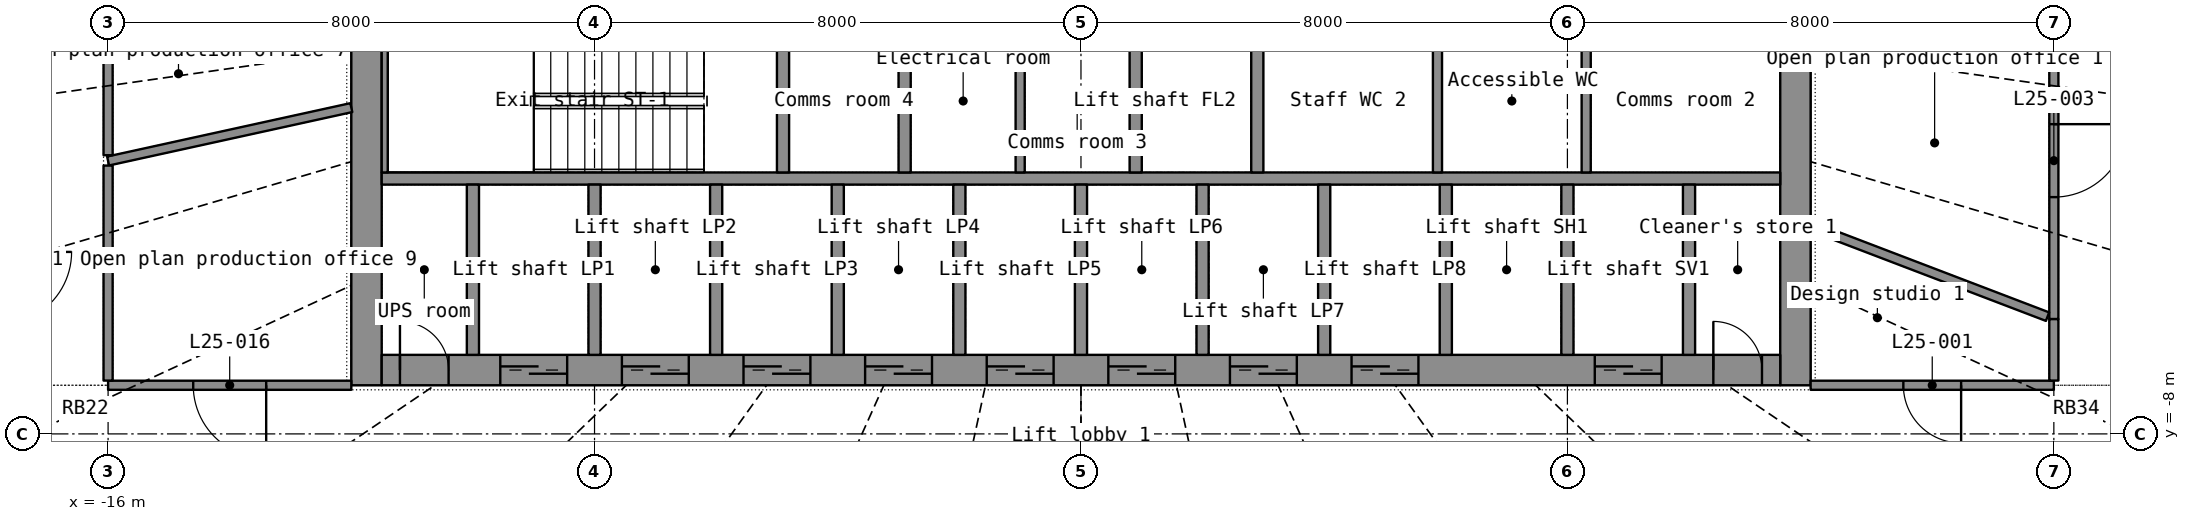
"""IFC4 building model, lengths in metres.
Left out: names, types, materials, properties, quantities, classifications, styles, units other than length and angle.
Written with IfcOpenShell. Run it as: python <this file> out.ifc"""

import sys

from ifc_helpers import new_model, si_unit, direction, frame, frame_2d, origin, place, context, subcontext, project, spatial, rectangle, extrude, element, fill, save


model = new_model("IFC4")
c1 = context("Model", 3, precision=1e-05, world=origin(), true_north=direction((0.0, 1.0)))
c2 = subcontext(c1, "Body", "Model", "MODEL_VIEW")
j1 = project(units=[si_unit("LENGTHUNIT", "METRE"), si_unit("PLANEANGLEUNIT", "RADIAN")], contexts=[c1])
p1 = place(None, origin())
s1 = spatial("IfcSite", under=j1, at=p1, CompositionType="ELEMENT")
p2 = place(p1, origin())
s2 = spatial("IfcBuilding", under=s1, at=p2, CompositionType="ELEMENT")
p3 = place(p2, frame((0.0, 0.0, 108.2)))
s3 = spatial("IfcBuildingStorey", under=s2, at=p3, CompositionType="ELEMENT", Elevation=108.2)
p4 = place(p3, frame((-11.75, -7.2, 0.0), z_axis=(0.0, 0.0, 1.0), x_axis=(0.0, 1.0, 0.0)))
e1 = element("IfcWall", 1, at=p4, inside=s3, PredefinedType="SHEAR", context=c2, shape_type="SweptSolid", body=[
    extrude(rectangle(XDim=14.4, YDim=0.5, at=frame_2d((7.2, 0.0))), origin(), (0.0, 0.0, 1.0), 3.3),
])
p5 = place(p4, frame((6.5, 0.0, 0.0)))
e2 = element("IfcOpeningElement", 2, at=p5, cuts=e1, PredefinedType="OPENING", context=c2, shape_type="SweptSolid", body=[
    extrude(rectangle(XDim=1.4, YDim=2.2, at=frame_2d((0.7, 1.1))), frame((0.0, 0.26, 0.0), z_axis=(0.0, -1.0, 0.0), x_axis=(1.0, 0.0, 0.0)), (0.0, 0.0, 1.0), 0.52),
])
p6 = place(p3, frame((11.75, -7.2, 0.0), z_axis=(0.0, 0.0, 1.0), x_axis=(0.0, 1.0, 0.0)))
e3 = element("IfcWall", 3, at=p6, inside=s3, PredefinedType="SHEAR", context=c2, shape_type="SweptSolid", body=[
    extrude(rectangle(XDim=14.4, YDim=0.5, at=frame_2d((7.2, 0.0))), origin(), (0.0, 0.0, 1.0), 3.3),
])
p7 = place(p6, frame((6.5, 0.0, 0.0)))
e4 = element("IfcOpeningElement", 4, at=p7, cuts=e3, PredefinedType="OPENING", context=c2, shape_type="SweptSolid", body=[
    extrude(rectangle(XDim=1.4, YDim=2.2, at=frame_2d((0.7, 1.1))), frame((0.0, 0.26, 0.0), z_axis=(0.0, -1.0, 0.0), x_axis=(1.0, 0.0, 0.0)), (0.0, 0.0, 1.0), 0.52),
])
p8 = place(p3, frame((-11.5, -6.95, 0.0), z_axis=(0.0, 0.0, 1.0), x_axis=(1.0, 0.0, 0.0)))
e5 = element("IfcWall", 5, at=p8, inside=s3, PredefinedType="SHEAR", context=c2, shape_type="SweptSolid", body=[
    extrude(rectangle(XDim=23.0, YDim=0.5, at=frame_2d((11.5, 0.0))), origin(), (0.0, 0.0, 1.0), 3.3),
])
p9 = place(p8, frame((1.95, 0.0, 0.0)))
e6 = element("IfcOpeningElement", 6, at=p9, cuts=e5, PredefinedType="OPENING", context=c2, shape_type="SweptSolid", body=[
    extrude(rectangle(XDim=1.1, YDim=2.2, at=frame_2d((0.55, 1.1))), frame((0.0, 0.26, 0.0), z_axis=(0.0, -1.0, 0.0), x_axis=(1.0, 0.0, 0.0)), (0.0, 0.0, 1.0), 0.52),
])
p10 = place(p8, frame((3.95, 0.0, 0.0)))
e7 = element("IfcOpeningElement", 7, at=p10, cuts=e5, PredefinedType="OPENING", context=c2, shape_type="SweptSolid", body=[
    extrude(rectangle(XDim=1.1, YDim=2.2, at=frame_2d((0.55, 1.1))), frame((0.0, 0.26, 0.0), z_axis=(0.0, -1.0, 0.0), x_axis=(1.0, 0.0, 0.0)), (0.0, 0.0, 1.0), 0.52),
])
p11 = place(p8, frame((5.95, 0.0, 0.0)))
e8 = element("IfcOpeningElement", 8, at=p11, cuts=e5, PredefinedType="OPENING", context=c2, shape_type="SweptSolid", body=[
    extrude(rectangle(XDim=1.1, YDim=2.2, at=frame_2d((0.55, 1.1))), frame((0.0, 0.26, 0.0), z_axis=(0.0, -1.0, 0.0), x_axis=(1.0, 0.0, 0.0)), (0.0, 0.0, 1.0), 0.52),
])
p12 = place(p8, frame((7.95, 0.0, 0.0)))
e9 = element("IfcOpeningElement", 9, at=p12, cuts=e5, PredefinedType="OPENING", context=c2, shape_type="SweptSolid", body=[
    extrude(rectangle(XDim=1.1, YDim=2.2, at=frame_2d((0.55, 1.1))), frame((0.0, 0.26, 0.0), z_axis=(0.0, -1.0, 0.0), x_axis=(1.0, 0.0, 0.0)), (0.0, 0.0, 1.0), 0.52),
])
p13 = place(p8, frame((9.95, 0.0, 0.0)))
e10 = element("IfcOpeningElement", 10, at=p13, cuts=e5, PredefinedType="OPENING", context=c2, shape_type="SweptSolid", body=[
    extrude(rectangle(XDim=1.1, YDim=2.2, at=frame_2d((0.55, 1.1))), frame((0.0, 0.26, 0.0), z_axis=(0.0, -1.0, 0.0), x_axis=(1.0, 0.0, 0.0)), (0.0, 0.0, 1.0), 0.52),
])
p14 = place(p8, frame((11.95, 0.0, 0.0)))
e11 = element("IfcOpeningElement", 11, at=p14, cuts=e5, PredefinedType="OPENING", context=c2, shape_type="SweptSolid", body=[
    extrude(rectangle(XDim=1.1, YDim=2.2, at=frame_2d((0.55, 1.1))), frame((0.0, 0.26, 0.0), z_axis=(0.0, -1.0, 0.0), x_axis=(1.0, 0.0, 0.0)), (0.0, 0.0, 1.0), 0.52),
])
p15 = place(p8, frame((13.95, 0.0, 0.0)))
e12 = element("IfcOpeningElement", 12, at=p15, cuts=e5, PredefinedType="OPENING", context=c2, shape_type="SweptSolid", body=[
    extrude(rectangle(XDim=1.1, YDim=2.2, at=frame_2d((0.55, 1.1))), frame((0.0, 0.26, 0.0), z_axis=(0.0, -1.0, 0.0), x_axis=(1.0, 0.0, 0.0)), (0.0, 0.0, 1.0), 0.52),
])
p16 = place(p8, frame((15.95, 0.0, 0.0)))
e13 = element("IfcOpeningElement", 13, at=p16, cuts=e5, PredefinedType="OPENING", context=c2, shape_type="SweptSolid", body=[
    extrude(rectangle(XDim=1.1, YDim=2.2, at=frame_2d((0.55, 1.1))), frame((0.0, 0.26, 0.0), z_axis=(0.0, -1.0, 0.0), x_axis=(1.0, 0.0, 0.0)), (0.0, 0.0, 1.0), 0.52),
])
p17 = place(p8, frame((19.95, 0.0, 0.0)))
e14 = element("IfcOpeningElement", 14, at=p17, cuts=e5, PredefinedType="OPENING", context=c2, shape_type="SweptSolid", body=[
    extrude(rectangle(XDim=1.1, YDim=2.2, at=frame_2d((0.55, 1.1))), frame((0.0, 0.26, 0.0), z_axis=(0.0, -1.0, 0.0), x_axis=(1.0, 0.0, 0.0)), (0.0, 0.0, 1.0), 0.52),
])
p18 = place(p8, frame((0.3, 0.0, 0.0)))
e15 = element("IfcOpeningElement", 15, at=p18, cuts=e5, PredefinedType="OPENING", context=c2, shape_type="SweptSolid", body=[
    extrude(rectangle(XDim=0.8, YDim=2.05, at=frame_2d((0.4, 1.025))), frame((0.0, 0.26, 0.0), z_axis=(0.0, -1.0, 0.0), x_axis=(1.0, 0.0, 0.0)), (0.0, 0.0, 1.0), 0.52),
])
p19 = place(p8, frame((21.9, 0.0, 0.0)))
e16 = element("IfcOpeningElement", 16, at=p19, cuts=e5, PredefinedType="OPENING", context=c2, shape_type="SweptSolid", body=[
    extrude(rectangle(XDim=0.8, YDim=2.05, at=frame_2d((0.4, 1.025))), frame((0.0, 0.26, 0.0), z_axis=(0.0, -1.0, 0.0), x_axis=(1.0, 0.0, 0.0)), (0.0, 0.0, 1.0), 0.52),
])
p20 = place(p3, frame((-11.5, -3.8, 0.0), z_axis=(0.0, 0.0, 1.0), x_axis=(1.0, 0.0, 0.0)))
e17 = element("IfcWall", 17, at=p20, inside=s3, PredefinedType="SHEAR", context=c2, shape_type="SweptSolid", body=[
    extrude(rectangle(XDim=23.0, YDim=0.2, at=frame_2d((11.5, 0.0))), origin(), (0.0, 0.0, 1.0), 3.3),
])
for number, where, z_axis, x_axis in (
    (18, (-10.0, -6.7, 0.0), (0.0, 0.0, 1.0), (0.0, 1.0, 0.0)),
    (19, (-8.0, -6.7, 0.0), (0.0, 0.0, 1.0), (0.0, 1.0, 0.0)),
    (20, (-6.0, -6.7, 0.0), (0.0, 0.0, 1.0), (0.0, 1.0, 0.0)),
    (21, (-4.0, -6.7, 0.0), (0.0, 0.0, 1.0), (0.0, 1.0, 0.0)),
    (22, (-2.0, -6.7, 0.0), (0.0, 0.0, 1.0), (0.0, 1.0, 0.0)),
    (23, (0.0, -6.7, 0.0), (0.0, 0.0, 1.0), (0.0, 1.0, 0.0)),
    (24, (2.0, -6.7, 0.0), (0.0, 0.0, 1.0), (0.0, 1.0, 0.0)),
    (25, (4.0, -6.7, 0.0), (0.0, 0.0, 1.0), (0.0, 1.0, 0.0)),
    (26, (6.0, -6.7, 0.0), (0.0, 0.0, 1.0), (0.0, 1.0, 0.0)),
    (27, (8.0, -6.7, 0.0), (0.0, 0.0, 1.0), (0.0, 1.0, 0.0)),
    (28, (10.0, -6.7, 0.0), (0.0, 0.0, 1.0), (0.0, 1.0, 0.0)),
):
    element("IfcWall", number, at=place(p3, frame(where, z_axis=z_axis, x_axis=x_axis)), inside=s3, PredefinedType="SHEAR", context=c2, shape_type="SweptSolid", body=[
        extrude(rectangle(XDim=2.8, YDim=0.2, at=frame_2d((1.4, 0.0))), origin(), (0.0, 0.0, 1.0), 3.3),
    ])
p21 = place(p3, frame((-2.9, -3.7, 0.0), z_axis=(0.0, 0.0, 1.0), x_axis=(0.0, 1.0, 0.0)))
e29 = element("IfcWall", 29, at=p21, inside=s3, PredefinedType="SHEAR", context=c2, shape_type="SweptSolid", body=[
    extrude(rectangle(XDim=7.4, YDim=0.2, at=frame_2d((3.7, 0.0))), origin(), (0.0, 0.0, 1.0), 3.3),
])
p22 = place(p21, frame((3.1, 0.0, 0.0)))
e30 = element("IfcOpeningElement", 30, at=p22, cuts=e29, PredefinedType="OPENING", context=c2, shape_type="SweptSolid", body=[
    extrude(rectangle(XDim=1.2, YDim=2.2, at=frame_2d((0.6, 1.1))), frame((0.0, 0.11, 0.0), z_axis=(0.0, -1.0, 0.0), x_axis=(1.0, 0.0, 0.0)), (0.0, 0.0, 1.0), 0.22),
])
p23 = place(p3, frame((2.9, -3.7, 0.0), z_axis=(0.0, 0.0, 1.0), x_axis=(0.0, 1.0, 0.0)))
e31 = element("IfcWall", 31, at=p23, inside=s3, PredefinedType="SHEAR", context=c2, shape_type="SweptSolid", body=[
    extrude(rectangle(XDim=7.4, YDim=0.2, at=frame_2d((3.7, 0.0))), origin(), (0.0, 0.0, 1.0), 3.3),
])
p24 = place(p23, frame((3.1, 0.0, 0.0)))
e32 = element("IfcOpeningElement", 32, at=p24, cuts=e31, PredefinedType="OPENING", context=c2, shape_type="SweptSolid", body=[
    extrude(rectangle(XDim=1.2, YDim=2.2, at=frame_2d((0.6, 1.1))), frame((0.0, 0.11, 0.0), z_axis=(0.0, -1.0, 0.0), x_axis=(1.0, 0.0, 0.0)), (0.0, 0.0, 1.0), 0.22),
])
p25 = place(p3, frame((0.9, -3.7, 0.0), z_axis=(0.0, 0.0, 1.0), x_axis=(0.0, 1.0, 0.0)))
e33 = element("IfcWall", 33, at=p25, inside=s3, PredefinedType="SHEAR", context=c2, shape_type="SweptSolid", body=[
    extrude(rectangle(XDim=2.35, YDim=0.2, at=frame_2d((1.175, 0.0))), origin(), (0.0, 0.0, 1.0), 3.3),
])
p26 = place(p3, frame((-11.45, -3.7, 0.0), z_axis=(0.0, 0.0, 1.0), x_axis=(0.0, 1.0, 0.0)))
e34 = element("IfcWall", 34, at=p26, inside=s3, PredefinedType="SHEAR", context=c2, shape_type="SweptSolid", body=[
    extrude(rectangle(XDim=2.35, YDim=0.1, at=frame_2d((1.175, 0.0))), origin(), (0.0, 0.0, 1.0), 3.3),
])
p27 = place(p3, frame((-4.9, -3.7, 0.0), z_axis=(0.0, 0.0, 1.0), x_axis=(0.0, 1.0, 0.0)))
e35 = element("IfcWall", 35, at=p27, inside=s3, PredefinedType="SHEAR", context=c2, shape_type="SweptSolid", body=[
    extrude(rectangle(XDim=2.35, YDim=0.2, at=frame_2d((1.175, 0.0))), origin(), (0.0, 0.0, 1.0), 3.3),
])
for number, where, z_axis, x_axis in (
    (36, (5.863, -3.7, 0.0), (0.0, 0.0, 1.0), (0.0, 1.0, 0.0)),
    (37, (8.309, -3.7, 0.0), (0.0, 0.0, 1.0), (0.0, 1.0, 0.0)),
    (38, (-1.0, -3.7, 0.0), (0.0, 0.0, 1.0), (0.0, 1.0, 0.0)),
):
    element("IfcWall", number, at=place(p3, frame(where, z_axis=z_axis, x_axis=x_axis)), inside=s3, PredefinedType="PARTITIONING", context=c2, shape_type="SweptSolid", body=[
        extrude(rectangle(XDim=2.35, YDim=0.15, at=frame_2d((1.175, 0.0))), origin(), (0.0, 0.0, 1.0), 3.3),
    ])
p28 = place(p3, frame((16.0, -0.9, 0.0), z_axis=(0.0, 0.0, 1.0), x_axis=(0.0, -1.0, 0.0)))
e39 = element("IfcWall", 39, at=p28, inside=s3, PredefinedType="PARTITIONING", context=c2, shape_type="SweptSolid", body=[
    extrude(rectangle(XDim=5.211, YDim=0.15, at=frame_2d((2.606, 0.0))), origin(), (0.0, 0.0, 1.0), 2.4),
])
p29 = place(p28, frame((2.006, 0.0, 0.0)))
e40 = element("IfcOpeningElement", 40, at=p29, cuts=e39, PredefinedType="OPENING", context=c2, shape_type="SweptSolid", body=[
    extrude(rectangle(XDim=1.2, YDim=2.2, at=frame_2d((0.6, 1.1))), frame((0.0, 0.085, 0.0), z_axis=(0.0, -1.0, 0.0), x_axis=(1.0, 0.0, 0.0)), (0.0, 0.0, 1.0), 0.17),
])
p30 = place(p3, frame((15.896, -6.072, 0.0), z_axis=(0.0, 0.0, 1.0), x_axis=(-0.934175823, 0.356813021, 0.0)))
e41 = element("IfcWall", 41, at=p30, inside=s3, PredefinedType="PARTITIONING", context=c2, shape_type="SweptSolid", body=[
    extrude(rectangle(XDim=4.171, YDim=0.15, at=frame_2d((2.085, 0.0))), origin(), (0.0, 0.0, 1.0), 2.4),
])
p31 = place(p3, frame((-16.0, -3.512, 0.0), z_axis=(0.0, 0.0, 1.0), x_axis=(0.976750433, 0.214379551, 0.0)))
e42 = element("IfcWall", 42, at=p31, inside=s3, PredefinedType="PARTITIONING", context=c2, shape_type="SweptSolid", body=[
    extrude(rectangle(XDim=4.095, YDim=0.15, at=frame_2d((2.048, 0.0))), origin(), (0.0, 0.0, 1.0), 2.4),
])
p32 = place(p3, frame((-12.0, -7.2, 0.0), z_axis=(0.0, 0.0, 1.0), x_axis=(-1.0, 0.0, 0.0)))
e43 = element("IfcWall", 43, at=p32, inside=s3, PredefinedType="PARTITIONING", context=c2, shape_type="SweptSolid", body=[
    extrude(rectangle(XDim=4.0, YDim=0.15, at=frame_2d((2.0, 0.0))), origin(), (0.0, 0.0, 1.0), 2.4),
])
p33 = place(p32, frame((1.4, 0.0, 0.0)))
e44 = element("IfcOpeningElement", 44, at=p33, cuts=e43, PredefinedType="OPENING", context=c2, shape_type="SweptSolid", body=[
    extrude(rectangle(XDim=1.2, YDim=2.2, at=frame_2d((0.6, 1.1))), frame((0.0, 0.085, 0.0), z_axis=(0.0, -1.0, 0.0), x_axis=(1.0, 0.0, 0.0)), (0.0, 0.0, 1.0), 0.17),
])
p34 = place(p3, frame((16.0, -7.2, 0.0), z_axis=(0.0, 0.0, 1.0), x_axis=(-1.0, 0.0, 0.0)))
e45 = element("IfcWall", 45, at=p34, inside=s3, PredefinedType="PARTITIONING", context=c2, shape_type="SweptSolid", body=[
    extrude(rectangle(XDim=4.0, YDim=0.15, at=frame_2d((2.0, 0.0))), origin(), (0.0, 0.0, 1.0), 2.4),
])
p35 = place(p34, frame((1.525, 0.0, 0.0)))
e46 = element("IfcOpeningElement", 46, at=p35, cuts=e45, PredefinedType="OPENING", context=c2, shape_type="SweptSolid", body=[
    extrude(rectangle(XDim=0.95, YDim=2.15, at=frame_2d((0.475, 1.075))), frame((0.0, 0.085, 0.0), z_axis=(0.0, -1.0, 0.0), x_axis=(1.0, 0.0, 0.0)), (0.0, 0.0, 1.0), 0.17),
])
p36 = place(p3, frame((-16.0, -7.123, 0.0), z_axis=(0.0, 0.0, 1.0), x_axis=(0.0, 1.0, 0.0)))
e47 = element("IfcWall", 47, at=p36, inside=s3, PredefinedType="PARTITIONING", context=c2, shape_type="SweptSolid", body=[
    extrude(rectangle(XDim=3.536, YDim=0.15, at=frame_2d((1.768, 0.0))), origin(), (0.0, 0.0, 1.0), 2.4),
])
p37 = place(p3, frame((-16.0, -3.417, 0.0), z_axis=(0.0, 0.0, 1.0), x_axis=(0.0, 1.0, 0.0)))
e48 = element("IfcWall", 48, at=p37, inside=s3, PredefinedType="PARTITIONING", context=c2, shape_type="SweptSolid", body=[
    extrude(rectangle(XDim=2.439, YDim=0.15, at=frame_2d((1.22, 0.0))), origin(), (0.0, 0.0, 1.0), 2.4),
])
p38 = place(p3, frame((16.0, -6.112, 0.0), z_axis=(0.0, 0.0, 1.0), x_axis=(0.0, -1.0, 0.0)))
e49 = element("IfcWall", 49, at=p38, inside=s3, PredefinedType="PARTITIONING", context=c2, shape_type="SweptSolid", body=[
    extrude(rectangle(XDim=1.011, YDim=0.15, at=frame_2d((0.505, 0.0))), origin(), (0.0, 0.0, 1.0), 2.4),
])
p39 = place(p9, origin())
e50 = element("IfcDoor", 50, at=p39, inside=s3, OperationType="DOUBLE_DOOR_SLIDING", PredefinedType="DOOR", context=c2, shape_type="SweptSolid", body=[
    extrude(rectangle(XDim=1.1, YDim=2.2, at=frame_2d((0.55, 1.1))), frame((0.0, 0.025, 0.0), z_axis=(0.0, -1.0, 0.0), x_axis=(1.0, 0.0, 0.0)), (0.0, 0.0, 1.0), 0.05),
])
fill(e6, e50)
p40 = place(p10, origin())
e51 = element("IfcDoor", 51, at=p40, inside=s3, OperationType="DOUBLE_DOOR_SLIDING", PredefinedType="DOOR", context=c2, shape_type="SweptSolid", body=[
    extrude(rectangle(XDim=1.1, YDim=2.2, at=frame_2d((0.55, 1.1))), frame((0.0, 0.025, 0.0), z_axis=(0.0, -1.0, 0.0), x_axis=(1.0, 0.0, 0.0)), (0.0, 0.0, 1.0), 0.05),
])
fill(e7, e51)
p41 = place(p11, origin())
e52 = element("IfcDoor", 52, at=p41, inside=s3, OperationType="DOUBLE_DOOR_SLIDING", PredefinedType="DOOR", context=c2, shape_type="SweptSolid", body=[
    extrude(rectangle(XDim=1.1, YDim=2.2, at=frame_2d((0.55, 1.1))), frame((0.0, 0.025, 0.0), z_axis=(0.0, -1.0, 0.0), x_axis=(1.0, 0.0, 0.0)), (0.0, 0.0, 1.0), 0.05),
])
fill(e8, e52)
p42 = place(p12, origin())
e53 = element("IfcDoor", 53, at=p42, inside=s3, OperationType="DOUBLE_DOOR_SLIDING", PredefinedType="DOOR", context=c2, shape_type="SweptSolid", body=[
    extrude(rectangle(XDim=1.1, YDim=2.2, at=frame_2d((0.55, 1.1))), frame((0.0, 0.025, 0.0), z_axis=(0.0, -1.0, 0.0), x_axis=(1.0, 0.0, 0.0)), (0.0, 0.0, 1.0), 0.05),
])
fill(e9, e53)
p43 = place(p13, origin())
e54 = element("IfcDoor", 54, at=p43, inside=s3, OperationType="DOUBLE_DOOR_SLIDING", PredefinedType="DOOR", context=c2, shape_type="SweptSolid", body=[
    extrude(rectangle(XDim=1.1, YDim=2.2, at=frame_2d((0.55, 1.1))), frame((0.0, 0.025, 0.0), z_axis=(0.0, -1.0, 0.0), x_axis=(1.0, 0.0, 0.0)), (0.0, 0.0, 1.0), 0.05),
])
fill(e10, e54)
p44 = place(p14, origin())
e55 = element("IfcDoor", 55, at=p44, inside=s3, OperationType="DOUBLE_DOOR_SLIDING", PredefinedType="DOOR", context=c2, shape_type="SweptSolid", body=[
    extrude(rectangle(XDim=1.1, YDim=2.2, at=frame_2d((0.55, 1.1))), frame((0.0, 0.025, 0.0), z_axis=(0.0, -1.0, 0.0), x_axis=(1.0, 0.0, 0.0)), (0.0, 0.0, 1.0), 0.05),
])
fill(e11, e55)
p45 = place(p15, origin())
e56 = element("IfcDoor", 56, at=p45, inside=s3, OperationType="DOUBLE_DOOR_SLIDING", PredefinedType="DOOR", context=c2, shape_type="SweptSolid", body=[
    extrude(rectangle(XDim=1.1, YDim=2.2, at=frame_2d((0.55, 1.1))), frame((0.0, 0.025, 0.0), z_axis=(0.0, -1.0, 0.0), x_axis=(1.0, 0.0, 0.0)), (0.0, 0.0, 1.0), 0.05),
])
fill(e12, e56)
p46 = place(p16, origin())
e57 = element("IfcDoor", 57, at=p46, inside=s3, OperationType="DOUBLE_DOOR_SLIDING", PredefinedType="DOOR", context=c2, shape_type="SweptSolid", body=[
    extrude(rectangle(XDim=1.1, YDim=2.2, at=frame_2d((0.55, 1.1))), frame((0.0, 0.025, 0.0), z_axis=(0.0, -1.0, 0.0), x_axis=(1.0, 0.0, 0.0)), (0.0, 0.0, 1.0), 0.05),
])
fill(e13, e57)
p47 = place(p17, origin())
e58 = element("IfcDoor", 58, at=p47, inside=s3, OperationType="DOUBLE_DOOR_SLIDING", PredefinedType="DOOR", context=c2, shape_type="SweptSolid", body=[
    extrude(rectangle(XDim=1.1, YDim=2.2, at=frame_2d((0.55, 1.1))), frame((0.0, 0.025, 0.0), z_axis=(0.0, -1.0, 0.0), x_axis=(1.0, 0.0, 0.0)), (0.0, 0.0, 1.0), 0.05),
])
fill(e14, e58)
p48 = place(p18, origin())
e59 = element("IfcDoor", 59, at=p48, inside=s3, OperationType="SINGLE_SWING_LEFT", PredefinedType="DOOR", context=c2, shape_type="SweptSolid", body=[
    extrude(rectangle(XDim=0.8, YDim=2.05, at=frame_2d((0.4, 1.025))), frame((0.0, 0.025, 0.0), z_axis=(0.0, -1.0, 0.0), x_axis=(1.0, 0.0, 0.0)), (0.0, 0.0, 1.0), 0.05),
])
fill(e15, e59)
p49 = place(p19, origin())
e60 = element("IfcDoor", 60, at=p49, inside=s3, OperationType="SINGLE_SWING_LEFT", PredefinedType="DOOR", context=c2, shape_type="SweptSolid", body=[
    extrude(rectangle(XDim=0.8, YDim=2.05, at=frame_2d((0.4, 1.025))), frame((0.0, 0.025, 0.0), z_axis=(0.0, -1.0, 0.0), x_axis=(1.0, 0.0, 0.0)), (0.0, 0.0, 1.0), 0.05),
])
fill(e16, e60)
p50 = place(p35, origin())
e61 = element("IfcDoor", 61, at=p50, inside=s3, OperationType="SINGLE_SWING_LEFT", PredefinedType="DOOR", context=c2, shape_type="SweptSolid", body=[
    extrude(rectangle(XDim=0.95, YDim=2.15, at=frame_2d((0.475, 1.075))), frame((0.0, 0.025, 0.0), z_axis=(0.0, -1.0, 0.0), x_axis=(1.0, 0.0, 0.0)), (0.0, 0.0, 1.0), 0.05),
])
fill(e46, e61)
p51 = place(p29, origin())
e62 = element("IfcDoor", 62, at=p51, inside=s3, OperationType="DOUBLE_DOOR_SINGLE_SWING", PredefinedType="DOOR", context=c2, shape_type="SweptSolid", body=[
    extrude(rectangle(XDim=1.2, YDim=2.2, at=frame_2d((0.6, 1.1))), frame((0.0, 0.025, 0.0), z_axis=(0.0, -1.0, 0.0), x_axis=(1.0, 0.0, 0.0)), (0.0, 0.0, 1.0), 0.05),
])
fill(e40, e62)
p52 = place(p33, origin())
e63 = element("IfcDoor", 63, at=p52, inside=s3, OperationType="DOUBLE_DOOR_SINGLE_SWING", PredefinedType="DOOR", context=c2, shape_type="SweptSolid", body=[
    extrude(rectangle(XDim=1.2, YDim=2.2, at=frame_2d((0.6, 1.1))), frame((0.0, 0.025, 0.0), z_axis=(0.0, -1.0, 0.0), x_axis=(1.0, 0.0, 0.0)), (0.0, 0.0, 1.0), 0.05),
])
fill(e44, e63)
save(model, sys.argv[1])
